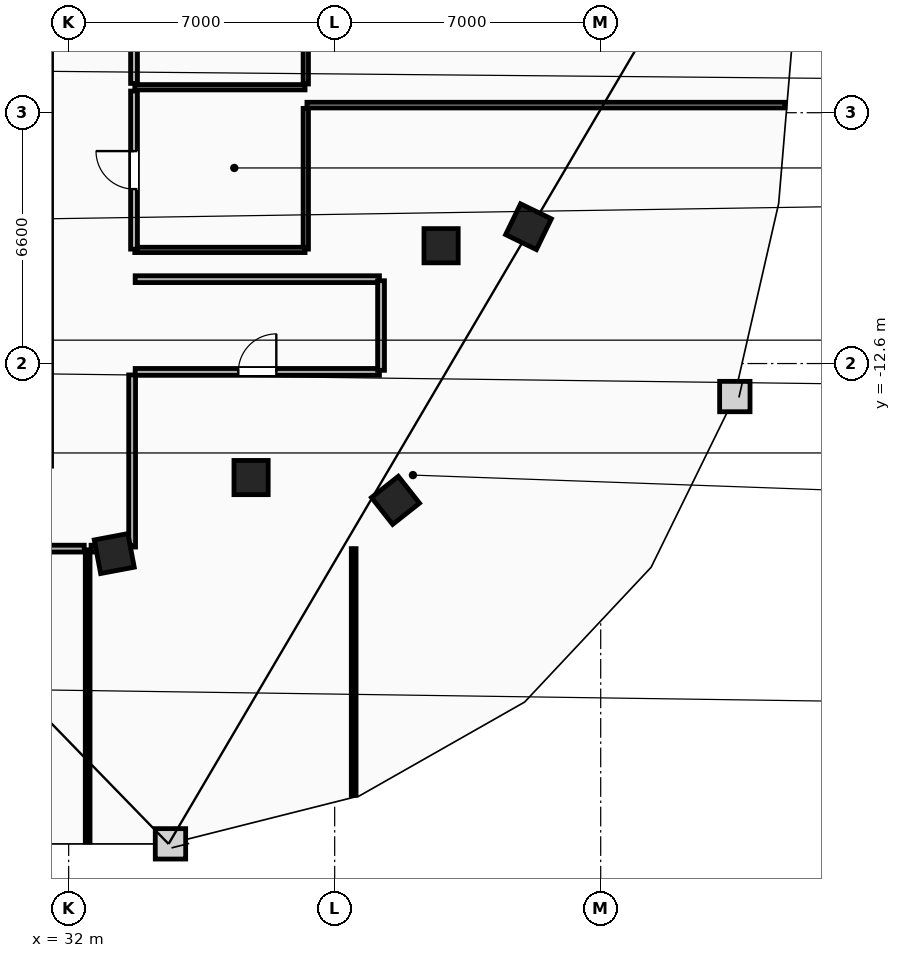
"""IFC4 building model, lengths in metres.
Left out: names, types, materials, properties, quantities, classifications, styles, units other than length and angle.
Written with IfcOpenShell. Run it as: python <this file> out.ifc"""

import sys

from ifc_helpers import new_model, si_unit, direction, frame, frame_2d, origin, origin_2d, place, context, subcontext, project, spatial, rectangle, extrude, element, fill, save


model = new_model("IFC4")
c1 = context("Model", 3, precision=1e-05, world=origin(), true_north=direction((0.0, 1.0)))
c2 = subcontext(c1, "Body", "Model", "MODEL_VIEW")
j1 = project(units=[si_unit("LENGTHUNIT", "METRE"), si_unit("PLANEANGLEUNIT", "RADIAN")], contexts=[c1])
p1 = place(None, origin())
s1 = spatial("IfcSite", under=j1, at=p1, CompositionType="ELEMENT")
p2 = place(p1, origin())
s2 = spatial("IfcBuilding", under=s1, at=p2, CompositionType="ELEMENT")
p3 = place(p2, frame((0.0, 0.0, 224.2)))
s3 = spatial("IfcBuildingStorey", under=s2, at=p3, CompositionType="ELEMENT", Elevation=224.2)
for number, where, z_axis, x_axis in (
    (1, (41.8, -9.5, 0.0), (0.0, 0.0, 1.0), (1.0, 0.0, 0.0)),
    (2, (36.8, -15.6, 0.0), (0.0, 0.0, 1.0), (1.0, 0.0, 0.0)),
    (3, (33.2, -17.6, 0.0), (0.0, 0.0, 1.0), (0.983, 0.186, 0.0)),
    (4, (40.6, -16.2, 0.0), (0.0, 0.0, 1.0), (0.785, 0.619, 0.0)),
    (5, (44.1, -9.0, 0.0), (0.0, 0.0, 1.0), (0.437, 0.899, 0.0)),
):
    element("IfcColumn", number, at=place(p3, frame(where, z_axis=z_axis, x_axis=x_axis)), inside=s3, PredefinedType="COLUMN", context=c2, shape_type="SweptSolid", body=[
        extrude(rectangle(XDim=0.9, YDim=0.9, at=origin_2d()), origin(), (0.0, 0.0, 1.0), 3.6),
    ])
p4 = place(p3, frame((38.24, -9.59, 0.0), z_axis=(0.0, 0.0, 1.0), x_axis=(0.0, 1.0, 0.0)))
e6 = element("IfcWall", 6, at=p4, inside=s3, PredefinedType="PARTITIONING", context=c2, shape_type="SweptSolid", body=[
    extrude(rectangle(XDim=3.705, YDim=0.14, at=frame_2d((1.853, 0.0))), origin(), (0.0, 0.0, 1.0), 3.34),
])
p5 = place(p3, frame((38.24, -5.245, 0.0), z_axis=(0.0, 0.0, 1.0), x_axis=(0.0, 1.0, 0.0)))
e7 = element("IfcWall", 7, at=p5, inside=s3, PredefinedType="PARTITIONING", context=c2, shape_type="SweptSolid", body=[
    extrude(rectangle(XDim=4.275, YDim=0.14, at=frame_2d((2.138, 0.0))), origin(), (0.0, 0.0, 1.0), 3.34),
])
for number, where, z_axis, x_axis in (
    (8, (33.74, -5.33, 0.0), (0.0, 0.0, 1.0), (1.0, 0.0, 0.0)),
    (9, (33.74, -9.61, 0.0), (0.0, 0.0, 1.0), (1.0, 0.0, 0.0)),
):
    element("IfcWall", number, at=place(p3, frame(where, z_axis=z_axis, x_axis=x_axis)), inside=s3, PredefinedType="PARTITIONING", context=c2, shape_type="SweptSolid", body=[
        extrude(rectangle(XDim=4.48, YDim=0.14, at=frame_2d((2.24, 0.0))), origin(), (0.0, 0.0, 1.0), 3.34),
    ])
p6 = place(p3, frame((33.72, -5.23, 0.0), z_axis=(0.0, 0.0, 1.0), x_axis=(0.0, 1.0, 0.0)))
e10 = element("IfcWall", 10, at=p6, inside=s3, PredefinedType="PARTITIONING", context=c2, shape_type="SweptSolid", body=[
    extrude(rectangle(XDim=4.26, YDim=0.18, at=frame_2d((2.13, 0.0))), origin(), (0.0, 0.0, 1.0), 3.34),
])
p7 = place(p6, frame((1.655, 0.0, 0.0)))
e11 = element("IfcOpeningElement", 11, at=p7, cuts=e10, PredefinedType="OPENING", context=c2, shape_type="SweptSolid", body=[
    extrude(rectangle(XDim=0.95, YDim=2.1, at=frame_2d((0.475, 1.05))), frame((0.0, 0.1, 0.0), z_axis=(0.0, -1.0, 0.0), x_axis=(1.0, 0.0, 0.0)), (0.0, 0.0, 1.0), 0.2),
])
p8 = place(p3, frame((33.72, -9.59, 0.0), z_axis=(0.0, 0.0, 1.0), x_axis=(0.0, 1.0, 0.0)))
e12 = element("IfcWall", 12, at=p8, inside=s3, PredefinedType="PARTITIONING", context=c2, shape_type="SweptSolid", body=[
    extrude(rectangle(XDim=4.16, YDim=0.18, at=frame_2d((2.08, 0.0))), origin(), (0.0, 0.0, 1.0), 3.34),
])
p9 = place(p8, frame((1.58, 0.0, 0.0)))
e13 = element("IfcOpeningElement", 13, at=p9, cuts=e12, PredefinedType="OPENING", context=c2, shape_type="SweptSolid", body=[
    extrude(rectangle(XDim=1.0, YDim=2.15, at=frame_2d((0.5, 1.075))), frame((0.0, 0.1, 0.0), z_axis=(0.0, -1.0, 0.0), x_axis=(1.0, 0.0, 0.0)), (0.0, 0.0, 1.0), 0.2),
])
p10 = place(p3, frame((38.27, -5.8, 0.0), z_axis=(0.0, 0.0, 1.0), x_axis=(1.0, 0.0, 0.0)))
e14 = element("IfcWall", 14, at=p10, inside=s3, PredefinedType="PARTITIONING", context=c2, shape_type="SweptSolid", body=[
    extrude(rectangle(XDim=12.581, YDim=0.15, at=frame_2d((6.29, 0.0))), origin(), (0.0, 0.0, 1.0), 3.34),
])
p11 = place(p3, frame((32.5, -25.19, 0.0), z_axis=(0.0, 0.0, 1.0), x_axis=(0.0, 1.0, 0.0)))
e15 = element("IfcWall", 15, at=p11, inside=s3, PredefinedType="PARTITIONING", context=c2, shape_type="SweptSolid", body=[
    extrude(rectangle(XDim=7.69, YDim=0.125, at=frame_2d((3.845, 0.0))), origin(), (0.0, 0.0, 1.0), 3.34),
])
p12 = place(p3, frame((39.5, -23.963, 0.0), z_axis=(0.0, 0.0, 1.0), x_axis=(0.0, 1.0, 0.0)))
e16 = element("IfcWall", 16, at=p12, inside=s3, PredefinedType="PARTITIONING", context=c2, shape_type="SweptSolid", body=[
    extrude(rectangle(XDim=6.493, YDim=0.125, at=frame_2d((3.246, 0.0))), origin(), (0.0, 0.0, 1.0), 3.34),
])
p13 = place(p3, frame((24.59, -17.47, 0.0), z_axis=(0.0, 0.0, 1.0), x_axis=(1.0, 0.0, 0.0)))
e17 = element("IfcWall", 17, at=p13, inside=s3, PredefinedType="PARTITIONING", context=c2, shape_type="SweptSolid", body=[
    extrude(rectangle(XDim=7.82, YDim=0.18, at=frame_2d((3.91, 0.0))), origin(), (0.0, 0.0, 1.0), 3.34),
])
p14 = place(p13, frame((3.41, 0.0, 0.0)))
e18 = element("IfcOpeningElement", 18, at=p14, cuts=e17, PredefinedType="OPENING", context=c2, shape_type="SweptSolid", body=[
    extrude(rectangle(XDim=1.0, YDim=2.15, at=frame_2d((0.5, 1.075))), frame((0.0, 0.1, 0.0), z_axis=(0.0, -1.0, 0.0), x_axis=(1.0, 0.0, 0.0)), (0.0, 0.0, 1.0), 0.2),
])
p15 = place(p3, frame((33.75, -12.82, 0.0), z_axis=(0.0, 0.0, 1.0), x_axis=(1.0, 0.0, 0.0)))
e19 = element("IfcWall", 19, at=p15, inside=s3, PredefinedType="PARTITIONING", context=c2, shape_type="SweptSolid", body=[
    extrude(rectangle(XDim=6.428, YDim=0.18, at=frame_2d((3.214, 0.0))), origin(), (0.0, 0.0, 1.0), 3.34),
])
p16 = place(p15, frame((2.714, 0.0, 0.0)))
e20 = element("IfcOpeningElement", 20, at=p16, cuts=e19, PredefinedType="OPENING", context=c2, shape_type="SweptSolid", body=[
    extrude(rectangle(XDim=1.0, YDim=2.15, at=frame_2d((0.5, 1.075))), frame((0.0, 0.1, 0.0), z_axis=(0.0, -1.0, 0.0), x_axis=(1.0, 0.0, 0.0)), (0.0, 0.0, 1.0), 0.2),
])
p17 = place(p3, frame((40.178, -10.38, 0.0), z_axis=(0.0, 0.0, 1.0), x_axis=(-1.0, 0.0, 0.0)))
e21 = element("IfcWall", 21, at=p17, inside=s3, PredefinedType="PARTITIONING", context=c2, shape_type="SweptSolid", body=[
    extrude(rectangle(XDim=6.428, YDim=0.18, at=frame_2d((3.214, 0.0))), origin(), (0.0, 0.0, 1.0), 3.34),
])
p18 = place(p3, frame((33.67, -17.428, 0.0), z_axis=(0.0, 0.0, 1.0), x_axis=(0.0, 1.0, 0.0)))
e22 = element("IfcWall", 22, at=p18, inside=s3, PredefinedType="PARTITIONING", context=c2, shape_type="SweptSolid", body=[
    extrude(rectangle(XDim=4.529, YDim=0.18, at=frame_2d((2.264, 0.0))), origin(), (0.0, 0.0, 1.0), 3.34),
])
p19 = place(p3, frame((40.22, -12.779, 0.0), z_axis=(0.0, 0.0, 1.0), x_axis=(0.0, 1.0, 0.0)))
e23 = element("IfcWall", 23, at=p19, inside=s3, PredefinedType="PARTITIONING", context=c2, shape_type="SweptSolid", body=[
    extrude(rectangle(XDim=2.357, YDim=0.18, at=frame_2d((1.179, 0.0))), origin(), (0.0, 0.0, 1.0), 3.34),
])
p20 = place(p3, frame((32.59, -17.47, 0.0), z_axis=(0.0, 0.0, 1.0), x_axis=(1.0, 0.0, 0.0)))
e24 = element("IfcWall", 24, at=p20, inside=s3, PredefinedType="PARTITIONING", context=c2, shape_type="SweptSolid", body=[
    extrude(rectangle(XDim=1.038, YDim=0.18, at=frame_2d((0.519, 0.0))), origin(), (0.0, 0.0, 1.0), 3.34),
])
p21 = place(p16, origin())
e25 = element("IfcDoor", 25, at=p21, inside=s3, OperationType="SINGLE_SWING_RIGHT", PredefinedType="DOOR", context=c2, shape_type="SweptSolid", body=[
    extrude(rectangle(XDim=1.0, YDim=2.15, at=frame_2d((0.5, 1.075))), frame((0.0, 0.025, 0.0), z_axis=(0.0, -1.0, 0.0), x_axis=(1.0, 0.0, 0.0)), (0.0, 0.0, 1.0), 0.05),
])
fill(e20, e25)
p22 = place(p9, origin())
e26 = element("IfcDoor", 26, at=p22, inside=s3, OperationType="SINGLE_SWING_RIGHT", PredefinedType="DOOR", context=c2, shape_type="SweptSolid", body=[
    extrude(rectangle(XDim=1.0, YDim=2.15, at=frame_2d((0.5, 1.075))), frame((0.0, 0.025, 0.0), z_axis=(0.0, -1.0, 0.0), x_axis=(1.0, 0.0, 0.0)), (0.0, 0.0, 1.0), 0.05),
])
fill(e13, e26)
save(model, sys.argv[1])
